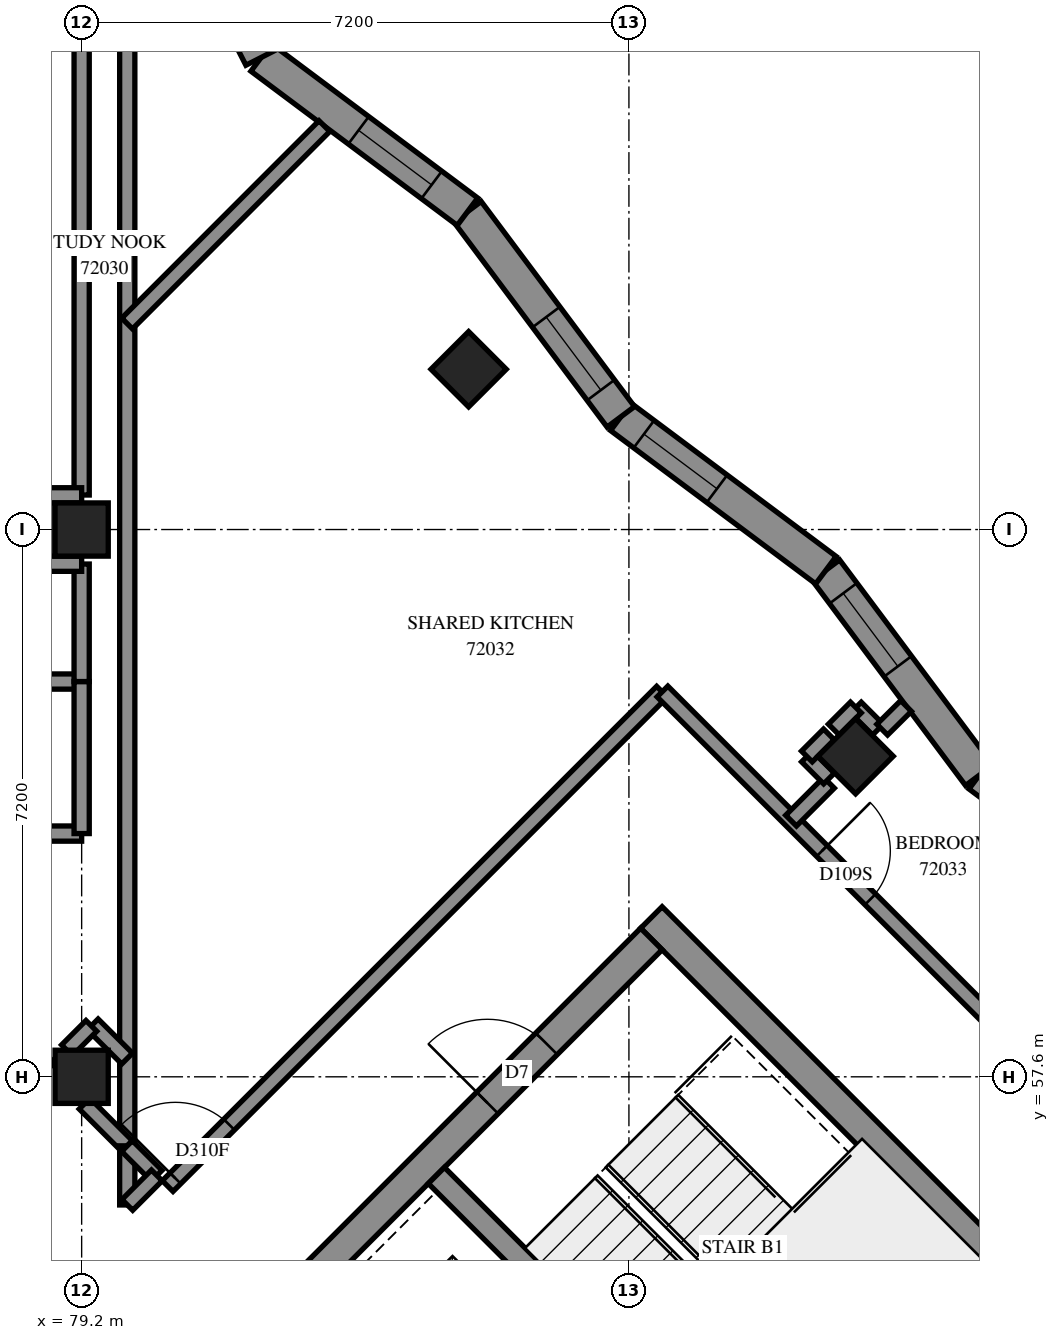
"""IFC4 building model, lengths in metres.
Left out: names, types, materials, properties, quantities, classifications, styles, units other than length and angle.
Written with IfcOpenShell. Run it as: python <this file> out.ifc"""

import sys

from ifc_helpers import new_model, si_unit, direction, frame, frame_2d, origin, origin_2d, place, context, subcontext, project, spatial, polyline, rectangle, outline, extrude, element, fill, save


model = new_model("IFC4")
c1 = context("Model", 3, precision=1e-05, world=origin(), true_north=direction((0.0, 1.0)))
c2 = subcontext(c1, "Body", "Model", "MODEL_VIEW")
j1 = project(units=[si_unit("LENGTHUNIT", "METRE"), si_unit("PLANEANGLEUNIT", "RADIAN")], contexts=[c1])
p1 = place(None, origin())
s1 = spatial("IfcSite", under=j1, at=p1, CompositionType="ELEMENT")
p2 = place(p1, origin())
s2 = spatial("IfcBuilding", under=s1, at=p2, CompositionType="ELEMENT")
p3 = place(p2, frame((0.0, 0.0, 264.2)))
s3 = spatial("IfcBuildingStorey", under=s2, at=p3, CompositionType="ELEMENT", Elevation=264.2)
for number, where, z_axis, x_axis in (
    (1, (79.2, 57.6, 0.0), (0.0, 0.0, 1.0), (1.0, 0.0, 0.0)),
    (2, (79.2, 64.8, 0.0), (0.0, 0.0, 1.0), (1.0, 0.0, 0.0)),
    (3, (84.291, 66.909, 0.0), (0.0, 0.0, 1.0), (0.707, -0.707, 0.0)),
    (4, (89.382, 61.818, 0.0), (0.0, 0.0, 1.0), (0.707, -0.707, 0.0)),
):
    element("IfcColumn", number, at=place(p3, frame(where, z_axis=z_axis, x_axis=x_axis)), inside=s3, PredefinedType="COLUMN", context=c2, shape_type="SweptSolid", body=[
        extrude(rectangle(XDim=0.7, YDim=0.7, at=origin_2d()), origin(), (0.0, 0.0, 1.0), 3.1),
    ])
p4 = place(p3, frame((86.695, 59.696, -0.3), z_axis=(0.0, 0.0, 1.0), x_axis=(0.7071100706, -0.7071034917, 0.0)))
e5 = element("IfcWall", 5, at=p4, inside=s3, PredefinedType="SHEAR", context=c2, shape_type="SweptSolid", body=[
    extrude(rectangle(XDim=15.2, YDim=0.4, at=frame_2d((7.6, 0.0))), origin(), (0.0, 0.0, 1.0), 2.7),
])
p5 = place(p4, frame((10.4, 0.0, 0.3)))
e6 = element("IfcOpeningElement", 6, at=p5, cuts=e5, PredefinedType="OPENING", context=c2, shape_type="SweptSolid", body=[
    extrude(rectangle(XDim=0.8, YDim=2.1, at=frame_2d((0.4, 1.05))), frame((0.0, 0.21, 0.0), z_axis=(0.0, -1.0, 0.0), x_axis=(1.0, 0.0, 0.0)), (0.0, 0.0, 1.0), 0.42),
])
p6 = place(p3, frame((76.513, 49.231, -0.3), z_axis=(0.0, 0.0, 1.0), x_axis=(0.7071067812, 0.7071067812, 0.0)))
e7 = element("IfcWall", 7, at=p6, inside=s3, PredefinedType="SHEAR", context=c2, shape_type="SweptSolid", body=[
    extrude(rectangle(XDim=14.4, YDim=0.4, at=frame_2d((7.2, 0.0))), origin(), (0.0, 0.0, 1.0), 2.7),
])
p7 = place(p6, frame((4.55, 0.0, 0.3)))
e8 = element("IfcOpeningElement", 8, at=p7, cuts=e7, PredefinedType="OPENING", context=c2, shape_type="SweptSolid", body=[
    extrude(rectangle(XDim=1.1, YDim=2.1, at=frame_2d((0.55, 1.05))), frame((0.0, 0.21, 0.0), z_axis=(0.0, -1.0, 0.0), x_axis=(1.0, 0.0, 0.0)), (0.0, 0.0, 1.0), 0.42),
])
p8 = place(p6, frame((11.35, 0.0, 0.3)))
e9 = element("IfcOpeningElement", 9, at=p8, cuts=e7, PredefinedType="OPENING", context=c2, shape_type="SweptSolid", body=[
    extrude(rectangle(XDim=1.1, YDim=2.1, at=frame_2d((0.55, 1.05))), frame((0.0, 0.21, 0.0), z_axis=(0.0, -1.0, 0.0), x_axis=(1.0, 0.0, 0.0)), (0.0, 0.0, 1.0), 0.42),
])
p9 = place(p3, frame((83.867, 56.302, 0.0), z_axis=(0.0, 0.0, 1.0), x_axis=(0.7071137256, -0.7070998367, 0.0)))
e10 = element("IfcWall", 10, at=p9, inside=s3, PredefinedType="SOLIDWALL", context=c2, shape_type="SweptSolid", body=[
    extrude(rectangle(XDim=7.2, YDim=0.3, at=frame_2d((3.6, 0.0))), origin(), (0.0, 0.0, 1.0), 3.1),
])
p10 = place(p3, frame((93.707, 59.55, 0.0), z_axis=(0.0, 0.0, 1.0), x_axis=(-0.8009854957, 0.5986837527, 0.0)))
e11 = element("IfcWall", 11, at=p10, inside=s3, PredefinedType="SOLIDWALL", context=c2, shape_type="SweptSolid", body=[
    extrude(outline(polyline([(-0.033, -0.225), (3.337, -0.225), (3.402, 0.225), (0.033, 0.225), (-0.033, -0.225)])), origin(), (0.0, 0.0, 1.0), 3.1),
])
p11 = place(p10, frame((1.521, 0.0, 0.45)))
e12 = element("IfcOpeningElement", 12, at=p11, cuts=e11, PredefinedType="OPENING", context=c2, shape_type="SweptSolid", body=[
    extrude(rectangle(XDim=1.2, YDim=2.55, at=frame_2d((0.6, 1.275))), frame((0.0, 0.235, 0.0), z_axis=(0.0, -1.0, 0.0), x_axis=(1.0, 0.0, 0.0)), (0.0, 0.0, 1.0), 0.47),
])
p12 = place(p3, frame((91.009, 61.567, 0.0), z_axis=(0.0, 0.0, 1.0), x_axis=(-0.598678943, 0.8009890906, 0.0)))
e13 = element("IfcWall", 13, at=p12, inside=s3, PredefinedType="SOLIDWALL", context=c2, shape_type="SweptSolid", body=[
    extrude(outline(polyline([(0.033, -0.225), (3.402, -0.225), (3.337, 0.225), (-0.033, 0.225), (0.033, -0.225)])), origin(), (0.0, 0.0, 1.0), 3.1),
])
p13 = place(p12, frame((1.789, 0.0, 0.45)))
e14 = element("IfcOpeningElement", 14, at=p13, cuts=e13, PredefinedType="OPENING", context=c2, shape_type="SweptSolid", body=[
    extrude(rectangle(XDim=1.2, YDim=2.55, at=frame_2d((0.6, 1.275))), frame((0.0, 0.235, 0.0), z_axis=(0.0, -1.0, 0.0), x_axis=(1.0, 0.0, 0.0)), (0.0, 0.0, 1.0), 0.47),
])
p14 = place(p3, frame((88.992, 64.266, 0.0), z_axis=(0.0, 0.0, 1.0), x_axis=(-0.8009854957, 0.5986837527, 0.0)))
e15 = element("IfcWall", 15, at=p14, inside=s3, PredefinedType="SOLIDWALL", context=c2, shape_type="SweptSolid", body=[
    extrude(outline(polyline([(-0.033, -0.225), (3.337, -0.225), (3.402, 0.225), (0.033, 0.225), (-0.033, -0.225)])), origin(), (0.0, 0.0, 1.0), 3.1),
])
p15 = place(p14, frame((1.789, 0.0, 0.45)))
e16 = element("IfcOpeningElement", 16, at=p15, cuts=e15, PredefinedType="OPENING", context=c2, shape_type="SweptSolid", body=[
    extrude(rectangle(XDim=1.2, YDim=2.55, at=frame_2d((0.6, 1.275))), frame((0.0, 0.235, 0.0), z_axis=(0.0, -1.0, 0.0), x_axis=(1.0, 0.0, 0.0)), (0.0, 0.0, 1.0), 0.47),
])
p16 = place(p3, frame((86.293, 66.283, 0.0), z_axis=(0.0, 0.0, 1.0), x_axis=(-0.5986647099, 0.8009997286, 0.0)))
e17 = element("IfcWall", 17, at=p16, inside=s3, PredefinedType="SOLIDWALL", context=c2, shape_type="SweptSolid", body=[
    extrude(outline(polyline([(0.033, -0.225), (3.402, -0.225), (3.337, 0.225), (-0.033, 0.225), (0.033, -0.225)])), origin(), (0.0, 0.0, 1.0), 3.1),
])
p17 = place(p16, frame((0.439, 0.0, 0.45)))
e18 = element("IfcOpeningElement", 18, at=p17, cuts=e17, PredefinedType="OPENING", context=c2, shape_type="SweptSolid", body=[
    extrude(rectangle(XDim=1.2, YDim=2.55, at=frame_2d((0.6, 1.275))), frame((0.0, 0.235, 0.0), z_axis=(0.0, -1.0, 0.0), x_axis=(1.0, 0.0, 0.0)), (0.0, 0.0, 1.0), 0.47),
])
p18 = place(p3, frame((84.276, 68.981, 0.0), z_axis=(0.0, 0.0, 1.0), x_axis=(-0.8009974095, 0.5986678127, 0.0)))
e19 = element("IfcWall", 19, at=p18, inside=s3, PredefinedType="SOLIDWALL", context=c2, shape_type="SweptSolid", body=[
    extrude(outline(polyline([(-0.033, -0.225), (3.337, -0.225), (3.441, 0.225), (0.033, 0.225), (-0.033, -0.225)])), origin(), (0.0, 0.0, 1.0), 3.1),
])
p19 = place(p18, frame((0.589, 0.0, 0.45)))
e20 = element("IfcOpeningElement", 20, at=p19, cuts=e19, PredefinedType="OPENING", context=c2, shape_type="SweptSolid", body=[
    extrude(rectangle(XDim=1.2, YDim=2.55, at=frame_2d((0.6, 1.275))), frame((0.0, 0.235, 0.0), z_axis=(0.0, -1.0, 0.0), x_axis=(1.0, 0.0, 0.0)), (0.0, 0.0, 1.0), 0.47),
])
p20 = place(p3, frame((81.561, 71.01, 0.0), z_axis=(0.0, 0.0, 1.0), x_axis=(-0.4543493723, 0.8908235784, 0.0)))
e21 = element("IfcWall", 21, at=p20, inside=s3, PredefinedType="SOLIDWALL", context=c2, shape_type="SweptSolid", body=[
    extrude(outline(polyline([(0.052, -0.225), (3.558, -0.225), (3.189, 0.225), (-0.052, 0.225), (0.052, -0.225)])), origin(), (0.0, 0.0, 1.0), 3.1),
])
p21 = place(p20, frame((0.746, 0.0, 0.45)))
e22 = element("IfcOpeningElement", 22, at=p21, cuts=e21, PredefinedType="OPENING", context=c2, shape_type="SweptSolid", body=[
    extrude(rectangle(XDim=1.2, YDim=2.55, at=frame_2d((0.6, 1.275))), frame((0.0, 0.235, 0.0), z_axis=(0.0, -1.0, 0.0), x_axis=(1.0, 0.0, 0.0)), (0.0, 0.0, 1.0), 0.47),
])
p22 = place(p3, frame((79.8, 56.692, 0.0), z_axis=(0.0, 0.0, 1.0), x_axis=(0.0, 1.0, 0.0)))
e23 = element("IfcWall", 23, at=p22, inside=s3, PredefinedType="PARTITIONING", context=c2, shape_type="SweptSolid", body=[
    extrude(rectangle(XDim=16.308, YDim=0.2, at=frame_2d((8.154, 0.0))), origin(), (0.0, 0.0, 1.0), 3.1),
])
p23 = place(p3, frame((80.332, 56.163, 0.0), z_axis=(0.0, 0.0, 1.0), x_axis=(0.7071067812, 0.7071067812, 0.0)))
e24 = element("IfcWall", 24, at=p23, inside=s3, PredefinedType="PARTITIONING", context=c2, shape_type="SweptSolid", body=[
    extrude(rectangle(XDim=9.198, YDim=0.2, at=frame_2d((4.599, 0.0))), origin(), (0.0, 0.0, 1.0), 3.1),
])
p24 = place(p23, frame((0.144, 0.0, 0.0)))
e25 = element("IfcOpeningElement", 25, at=p24, cuts=e24, PredefinedType="OPENING", context=c2, shape_type="SweptSolid", body=[
    extrude(rectangle(XDim=1.0, YDim=2.1, at=frame_2d((0.5, 1.05))), frame((0.0, 0.11, 0.0), z_axis=(0.0, -1.0, 0.0), x_axis=(1.0, 0.0, 0.0)), (0.0, 0.0, 1.0), 0.22),
])
p25 = place(p3, frame((86.841, 62.669, 0.0), z_axis=(0.0, 0.0, 1.0), x_axis=(0.7071067812, -0.7071067812, 0.0)))
e26 = element("IfcWall", 26, at=p25, inside=s3, PredefinedType="PARTITIONING", context=c2, shape_type="SweptSolid", body=[
    extrude(rectangle(XDim=8.799, YDim=0.2, at=frame_2d((4.4, 0.0))), origin(), (0.0, 0.0, 1.0), 3.1),
])
p26 = place(p25, frame((2.967, 0.0, 0.0)))
e27 = element("IfcOpeningElement", 27, at=p26, cuts=e26, PredefinedType="OPENING", context=c2, shape_type="SweptSolid", body=[
    extrude(rectangle(XDim=0.9, YDim=2.1, at=frame_2d((0.45, 1.05))), frame((0.0, 0.11, 0.0), z_axis=(0.0, -1.0, 0.0), x_axis=(1.0, 0.0, 0.0)), (0.0, 0.0, 1.0), 0.22),
])
p27 = place(p3, frame((79.2, 65.254, 0.0), z_axis=(0.0, 0.0, 1.0), x_axis=(0.0, 1.0, 0.0)))
e28 = element("IfcWall", 28, at=p27, inside=s3, PredefinedType="PARTITIONING", context=c2, shape_type="SweptSolid", body=[
    extrude(rectangle(XDim=6.292, YDim=0.2, at=frame_2d((3.146, 0.0))), origin(), (0.0, 0.0, 1.0), 3.1),
])
p28 = place(p3, frame((74.402, 62.8, 0.0), z_axis=(0.0, 0.0, 1.0), x_axis=(1.0, 0.0, 0.0)))
e29 = element("IfcWall", 29, at=p28, inside=s3, PredefinedType="PARTITIONING", context=c2, shape_type="SweptSolid", body=[
    extrude(rectangle(XDim=4.798, YDim=0.2, at=frame_2d((2.399, 0.0))), origin(), (0.0, 0.0, 1.0), 3.1),
])
p29 = place(p28, frame((1.723, 0.0, 0.0)))
e30 = element("IfcOpeningElement", 30, at=p29, cuts=e29, PredefinedType="OPENING", context=c2, shape_type="SweptSolid", body=[
    extrude(rectangle(XDim=1.0, YDim=2.1, at=frame_2d((0.5, 1.05))), frame((0.0, 0.11, 0.0), z_axis=(0.0, -1.0, 0.0), x_axis=(1.0, 0.0, 0.0)), (0.0, 0.0, 1.0), 0.22),
])
p30 = place(p3, frame((79.798, 67.51, 0.0), z_axis=(0.0, 0.0, 1.0), x_axis=(0.7068343875, 0.70737907, 0.0)))
e31 = element("IfcWall", 31, at=p30, inside=s3, PredefinedType="PARTITIONING", context=c2, shape_type="SweptSolid", body=[
    extrude(rectangle(XDim=3.672, YDim=0.2, at=frame_2d((1.836, 0.0))), origin(), (0.0, 0.0, 1.0), 3.1),
])
p31 = place(p3, frame((76.269, 60.217, 0.0), z_axis=(0.0, 0.0, 1.0), x_axis=(0.7071067812, -0.7071067812, 0.0)))
e32 = element("IfcWall", 32, at=p31, inside=s3, PredefinedType="PARTITIONING", context=c2, shape_type="SweptSolid", body=[
    extrude(rectangle(XDim=3.538, YDim=0.2, at=frame_2d((1.769, 0.0))), origin(), (0.0, 0.0, 1.0), 3.1),
])
p32 = place(p31, frame((1.891, 0.0, 0.0)))
e33 = element("IfcOpeningElement", 33, at=p32, cuts=e32, PredefinedType="OPENING", context=c2, shape_type="SweptSolid", body=[
    extrude(rectangle(XDim=1.0, YDim=2.1, at=frame_2d((0.5, 1.05))), frame((0.0, 0.11, 0.0), z_axis=(0.0, -1.0, 0.0), x_axis=(1.0, 0.0, 0.0)), (0.0, 0.0, 1.0), 0.22),
])
p33 = place(p3, frame((76.42, 60.8, 0.0), z_axis=(0.0, 0.0, 1.0), x_axis=(1.0, 0.0, 0.0)))
e34 = element("IfcWall", 34, at=p33, inside=s3, PredefinedType="PARTITIONING", context=c2, shape_type="SweptSolid", body=[
    extrude(rectangle(XDim=2.78, YDim=0.2, at=frame_2d((1.39, 0.0))), origin(), (0.0, 0.0, 1.0), 3.1),
])
p34 = place(p3, frame((79.2, 60.8, 0.0), z_axis=(0.0, 0.0, 1.0), x_axis=(0.0, 1.0, 0.0)))
e35 = element("IfcWall", 35, at=p34, inside=s3, PredefinedType="PARTITIONING", context=c2, shape_type="SweptSolid", body=[
    extrude(rectangle(XDim=2.0, YDim=0.2, at=frame_2d((1.0, 0.0))), origin(), (0.0, 0.0, 1.0), 3.1),
])
p35 = place(p3, frame((79.2, 62.8, 0.0), z_axis=(0.0, 0.0, 1.0), x_axis=(0.0, 1.0, 0.0)))
e36 = element("IfcWall", 36, at=p35, inside=s3, PredefinedType="PARTITIONING", context=c2, shape_type="SweptSolid", body=[
    extrude(rectangle(XDim=1.546, YDim=0.2, at=frame_2d((0.773, 0.0))), origin(), (0.0, 0.0, 1.0), 3.1),
])
p36 = place(p3, frame((78.75, 64.346, 0.0), z_axis=(0.0, 0.0, 1.0), x_axis=(0.0, 1.0, 0.0)))
e37 = element("IfcWall", 37, at=p36, inside=s3, PredefinedType="PARTITIONING", context=c2, shape_type="SweptSolid", body=[
    extrude(rectangle(XDim=0.908, YDim=0.2, at=frame_2d((0.454, 0.0))), origin(), (0.0, 0.0, 1.0), 3.1),
])
p37 = place(p3, frame((79.239, 57.247, 0.0), z_axis=(0.0, 0.0, 1.0), x_axis=(0.7071067812, -0.7071067812, 0.0)))
e38 = element("IfcWall", 38, at=p37, inside=s3, PredefinedType="PARTITIONING", context=c2, shape_type="SweptSolid", body=[
    extrude(rectangle(XDim=0.789, YDim=0.2, at=frame_2d((0.395, 0.0))), origin(), (0.0, 0.0, 1.0), 3.1),
])
p38 = place(p3, frame((79.8, 55.914, 0.0), z_axis=(0.0, 0.0, 1.0), x_axis=(0.0, 1.0, 0.0)))
e39 = element("IfcWall", 39, at=p38, inside=s3, PredefinedType="PARTITIONING", context=c2, shape_type="SweptSolid", body=[
    extrude(rectangle(XDim=0.778, YDim=0.2, at=frame_2d((0.389, 0.0))), origin(), (0.0, 0.0, 1.0), 3.1),
])
p39 = place(p3, frame((88.534, 60.971, 0.0), z_axis=(0.0, 0.0, 1.0), x_axis=(0.7071067812, 0.7071067812, 0.0)))
e40 = element("IfcWall", 40, at=p39, inside=s3, PredefinedType="PARTITIONING", context=c2, shape_type="SweptSolid", body=[
    extrude(rectangle(XDim=0.704, YDim=0.2, at=frame_2d((0.352, 0.0))), origin(), (0.0, 0.0, 1.0), 3.1),
])
p40 = place(p3, frame((79.346, 58.29, 0.0), z_axis=(0.0, 0.0, 1.0), x_axis=(0.7086729034, -0.7055371826, 0.0)))
e41 = element("IfcWall", 41, at=p40, inside=s3, PredefinedType="PARTITIONING", context=c2, shape_type="SweptSolid", body=[
    extrude(rectangle(XDim=0.638, YDim=0.2, at=frame_2d((0.319, 0.0))), origin(), (0.0, 0.0, 1.0), 3.1),
])
p41 = place(p3, frame((79.797, 56.689, 0.0), z_axis=(0.0, 0.0, 1.0), x_axis=(0.7071067812, -0.7071067812, 0.0)))
e42 = element("IfcWall", 42, at=p41, inside=s3, PredefinedType="PARTITIONING", context=c2, shape_type="SweptSolid", body=[
    extrude(rectangle(XDim=0.551, YDim=0.2, at=frame_2d((0.276, 0.0))), origin(), (0.0, 0.0, 1.0), 3.1),
])
p42 = place(p3, frame((79.801, 55.915, 0.0), z_axis=(0.0, 0.0, 1.0), x_axis=(0.7071067812, 0.7071067812, 0.0)))
e43 = element("IfcWall", 43, at=p42, inside=s3, PredefinedType="PARTITIONING", context=c2, shape_type="SweptSolid", body=[
    extrude(rectangle(XDim=0.549, YDim=0.2, at=frame_2d((0.274, 0.0))), origin(), (0.0, 0.0, 1.0), 3.1),
])
p43 = place(p3, frame((79.007, 57.949, 0.0), z_axis=(0.0, 0.0, 1.0), x_axis=(0.7071067812, 0.7071067812, 0.0)))
e44 = element("IfcWall", 44, at=p43, inside=s3, PredefinedType="PARTITIONING", context=c2, shape_type="SweptSolid", body=[
    extrude(rectangle(XDim=0.454, YDim=0.2, at=frame_2d((0.227, 0.0))), origin(), (0.0, 0.0, 1.0), 3.1),
])
for number, where, z_axis, x_axis in (
    (45, (78.75, 65.25, 0.0), (0.0, 0.0, 1.0), (1.0, 0.0, 0.0)),
    (46, (78.75, 64.35, 0.0), (0.0, 0.0, 1.0), (1.0, 0.0, 0.0)),
):
    element("IfcWall", number, at=place(p3, frame(where, z_axis=z_axis, x_axis=x_axis)), inside=s3, PredefinedType="PARTITIONING", context=c2, shape_type="SweptSolid", body=[
        extrude(rectangle(XDim=0.45, YDim=0.2, at=frame_2d((0.225, 0.0))), origin(), (0.0, 0.0, 1.0), 3.1),
    ])
for number, where, z_axis, x_axis in (
    (47, (88.743, 61.815, 0.0), (0.0, 0.0, 1.0), (0.707, -0.707, 0.0)),
    (48, (89.386, 62.458, 0.0), (0.0, 0.0, 1.0), (0.707, -0.707, 0.0)),
    (49, (88.741, 61.815, 0.0), (0.0, 0.0, 1.0), (0.707, 0.707, 0.0)),
    (50, (89.095, 62.169, 0.0), (0.0, 0.0, 1.0), (0.707, 0.707, 0.0)),
):
    element("IfcWall", number, at=place(p3, frame(where, z_axis=z_axis, x_axis=x_axis)), inside=s3, PredefinedType="PARTITIONING", context=c2, shape_type="SweptSolid", body=[
        extrude(rectangle(XDim=0.41, YDim=0.2, at=frame_2d((0.205, 0.0))), origin(), (0.0, 0.0, 1.0), 3.1),
    ])
p44 = place(p3, frame((89.733, 62.167, 0.0), z_axis=(0.0, 0.0, 1.0), x_axis=(0.7098168379, 0.7043862979, 0.0)))
e51 = element("IfcWall", 51, at=p44, inside=s3, PredefinedType="PARTITIONING", context=c2, shape_type="SweptSolid", body=[
    extrude(rectangle(XDim=0.442, YDim=0.2, at=frame_2d((0.221, 0.0))), origin(), (0.0, 0.0, 1.0), 3.1),
])
p45 = place(p13, origin())
e52 = element("IfcWindow", 52, at=p45, inside=s3, PartitioningType="SINGLE_PANEL", PredefinedType="WINDOW", context=c2, shape_type="SweptSolid", body=[
    extrude(rectangle(XDim=1.2, YDim=2.55, at=frame_2d((0.6, 1.275))), frame((0.0, 0.205, 0.0), z_axis=(0.0, -1.0, 0.0), x_axis=(1.0, 0.0, 0.0)), (0.0, 0.0, 1.0), 0.06),
])
fill(e14, e52)
p46 = place(p15, origin())
e53 = element("IfcWindow", 53, at=p46, inside=s3, PartitioningType="SINGLE_PANEL", PredefinedType="WINDOW", context=c2, shape_type="SweptSolid", body=[
    extrude(rectangle(XDim=1.2, YDim=2.55, at=frame_2d((0.6, 1.275))), frame((0.0, 0.205, 0.0), z_axis=(0.0, -1.0, 0.0), x_axis=(1.0, 0.0, 0.0)), (0.0, 0.0, 1.0), 0.06),
])
fill(e16, e53)
p47 = place(p17, origin())
e54 = element("IfcWindow", 54, at=p47, inside=s3, PartitioningType="SINGLE_PANEL", PredefinedType="WINDOW", context=c2, shape_type="SweptSolid", body=[
    extrude(rectangle(XDim=1.2, YDim=2.55, at=frame_2d((0.6, 1.275))), frame((0.0, 0.205, 0.0), z_axis=(0.0, -1.0, 0.0), x_axis=(1.0, 0.0, 0.0)), (0.0, 0.0, 1.0), 0.06),
])
fill(e18, e54)
p48 = place(p19, origin())
e55 = element("IfcWindow", 55, at=p48, inside=s3, PartitioningType="SINGLE_PANEL", PredefinedType="WINDOW", context=c2, shape_type="SweptSolid", body=[
    extrude(rectangle(XDim=1.2, YDim=2.55, at=frame_2d((0.6, 1.275))), frame((0.0, 0.205, 0.0), z_axis=(0.0, -1.0, 0.0), x_axis=(1.0, 0.0, 0.0)), (0.0, 0.0, 1.0), 0.06),
])
fill(e20, e55)
p49 = place(p8, origin())
e56 = element("IfcDoor", 56, at=p49, inside=s3, OperationType="SINGLE_SWING_LEFT", PredefinedType="DOOR", context=c2, shape_type="SweptSolid", body=[
    extrude(rectangle(XDim=1.1, YDim=2.1, at=frame_2d((0.55, 1.05))), frame((0.0, 0.025, 0.0), z_axis=(0.0, -1.0, 0.0), x_axis=(1.0, 0.0, 0.0)), (0.0, 0.0, 1.0), 0.05),
])
fill(e9, e56)
p50 = place(p24, origin())
e57 = element("IfcDoor", 57, at=p50, inside=s3, OperationType="SINGLE_SWING_RIGHT", PredefinedType="DOOR", context=c2, shape_type="SweptSolid", body=[
    extrude(rectangle(XDim=1.0, YDim=2.1, at=frame_2d((0.5, 1.05))), frame((0.0, 0.025, 0.0), z_axis=(0.0, -1.0, 0.0), x_axis=(1.0, 0.0, 0.0)), (0.0, 0.0, 1.0), 0.05),
])
fill(e25, e57)
p51 = place(p26, origin())
e58 = element("IfcDoor", 58, at=p51, inside=s3, OperationType="SINGLE_SWING_LEFT", PredefinedType="DOOR", context=c2, shape_type="SweptSolid", body=[
    extrude(rectangle(XDim=0.9, YDim=2.1, at=frame_2d((0.45, 1.05))), frame((0.0, 0.025, 0.0), z_axis=(0.0, -1.0, 0.0), x_axis=(1.0, 0.0, 0.0)), (0.0, 0.0, 1.0), 0.05),
])
fill(e27, e58)
save(model, sys.argv[1])
